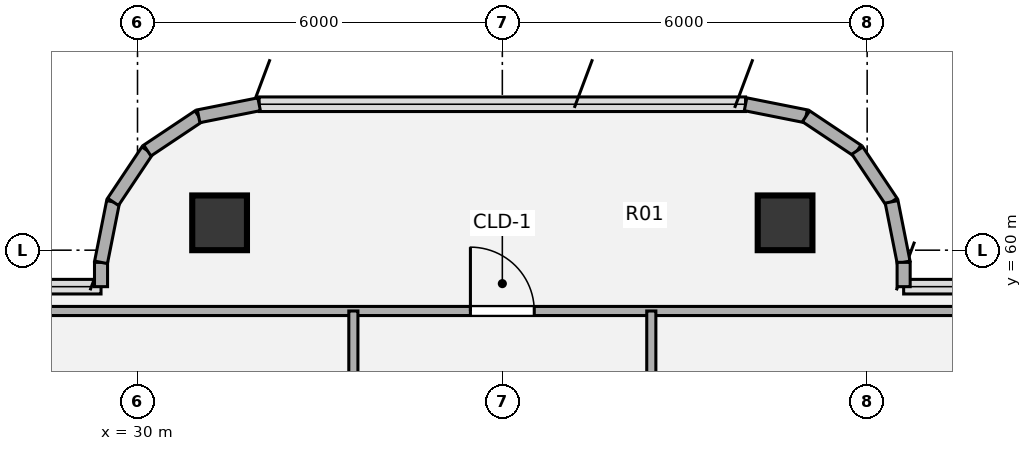
"""IFC4 building model, lengths in metres.
Left out: names, types, materials, properties, quantities, classifications, styles, units other than length and angle.
Written with IfcOpenShell. Run it as: python <this file> out.ifc"""

import sys

from ifc_helpers import new_model, si_unit, direction, frame, frame_2d, origin, origin_2d, place, context, subcontext, project, spatial, rectangle, hollow_circle, extrude, source, transform, mapped, element, fill, save


model = new_model("IFC4")
c1 = context("Model", 3, precision=1e-05, world=origin(), true_north=direction((0.0, 1.0)))
c2 = subcontext(c1, "Body", "Model", "MODEL_VIEW")
j1 = project(units=[si_unit("LENGTHUNIT", "METRE"), si_unit("PLANEANGLEUNIT", "RADIAN")], contexts=[c1])
p1 = place(None, origin())
s1 = spatial("IfcSite", under=j1, at=p1, CompositionType="ELEMENT")
p2 = place(p1, origin())
s2 = spatial("IfcBuilding", under=s1, at=p2, CompositionType="ELEMENT")
p3 = place(p2, frame((0.0, 0.0, 241.92)))
s3 = spatial("IfcBuildingStorey", under=s2, at=p3, CompositionType="ELEMENT", Elevation=241.92)
m1 = source(origin(), c2, "Body", "SweptSolid", [
    extrude(hollow_circle(Radius=0.45, WallThickness=0.032, at=origin_2d()), origin(), (0.0, 0.0, 1.0), 3.78),
])
for number, where, z_axis, x_axis in (
    (1, (31.35, 60.45, 0.0), (0.0, 0.0, 1.0), (1.0, 0.0, 0.0)),
    (2, (40.65, 60.45, 0.0), (0.0, 0.0, 1.0), (1.0, 0.0, 0.0)),
):
    element("IfcColumn", number, at=place(p3, frame(where, z_axis=z_axis, x_axis=x_axis)), inside=s3, PredefinedType="COLUMN", context=c2, shape_type="MappedRepresentation", body=[
        mapped(m1, transform((0.0, 0.0, 0.0), x_axis=(1.0, 0.0, 0.0), y_axis=(0.0, 1.0, 0.0), z_axis=(0.0, 0.0, 1.0), scale=1.0)),
    ])
p4 = place(p3, frame((29.4, 59.4, 0.0), z_axis=(0.0, 0.0, 1.0), x_axis=(0.0, 1.0, 0.0)))
e3 = element("IfcWall", 3, at=p4, inside=s3, PredefinedType="SOLIDWALL", context=c2, shape_type="SweptSolid", body=[
    extrude(rectangle(XDim=0.4, YDim=0.215, at=frame_2d((0.2, 0.0))), origin(), (0.0, 0.0, 1.0), 3.53),
])
p5 = place(p3, frame((29.4, 59.8, 0.0), z_axis=(0.0, 0.0, 1.0), x_axis=(0.195190360752, 0.980765376158, 0.0)))
e4 = element("IfcWall", 4, at=p5, inside=s3, PredefinedType="SOLIDWALL", context=c2, shape_type="SweptSolid", body=[
    extrude(rectangle(XDim=1.014, YDim=0.215, at=frame_2d((0.507, 0.0))), origin(), (0.0, 0.0, 1.0), 3.53),
])
p6 = place(p3, frame((29.598, 60.795, 0.0), z_axis=(0.0, 0.0, 1.0), x_axis=(0.555643898837, 0.831420385657, 0.0)))
e5 = element("IfcWall", 5, at=p6, inside=s3, PredefinedType="SOLIDWALL", context=c2, shape_type="SweptSolid", body=[
    extrude(rectangle(XDim=1.015, YDim=0.215, at=frame_2d((0.507, 0.0))), origin(), (0.0, 0.0, 1.0), 3.53),
])
p7 = place(p3, frame((30.162, 61.638, 0.0), z_axis=(0.0, 0.0, 1.0), x_axis=(0.831346067305, 0.555755086685, 0.0)))
e6 = element("IfcWall", 6, at=p7, inside=s3, PredefinedType="SOLIDWALL", context=c2, shape_type="SweptSolid", body=[
    extrude(rectangle(XDim=1.014, YDim=0.215, at=frame_2d((0.507, 0.0))), origin(), (0.0, 0.0, 1.0), 3.53),
])
for number, where, z_axis, x_axis in (
    (7, (31.005, 62.202, 0.0), (0.0, 0.0, 1.0), (0.981, 0.195, 0.0)),
    (8, (40.0, 62.4, 0.0), (0.0, 0.0, 1.0), (0.981, -0.195, 0.0)),
):
    element("IfcWall", number, at=place(p3, frame(where, z_axis=z_axis, x_axis=x_axis)), inside=s3, PredefinedType="SOLIDWALL", context=c2, shape_type="SweptSolid", body=[
        extrude(rectangle(XDim=1.015, YDim=0.215, at=frame_2d((0.507, 0.0))), origin(), (0.0, 0.0, 1.0), 3.53),
    ])
p8 = place(p3, frame((40.995, 62.202, 0.0), z_axis=(0.0, 0.0, 1.0), x_axis=(0.831346067305, -0.555755086685, 0.0)))
e9 = element("IfcWall", 9, at=p8, inside=s3, PredefinedType="SOLIDWALL", context=c2, shape_type="SweptSolid", body=[
    extrude(rectangle(XDim=1.014, YDim=0.215, at=frame_2d((0.507, 0.0))), origin(), (0.0, 0.0, 1.0), 3.53),
])
p9 = place(p3, frame((41.838, 61.638, 0.0), z_axis=(0.0, 0.0, 1.0), x_axis=(0.555643898837, -0.831420385657, 0.0)))
e10 = element("IfcWall", 10, at=p9, inside=s3, PredefinedType="SOLIDWALL", context=c2, shape_type="SweptSolid", body=[
    extrude(rectangle(XDim=1.015, YDim=0.215, at=frame_2d((0.507, 0.0))), origin(), (0.0, 0.0, 1.0), 3.53),
])
p10 = place(p3, frame((42.402, 60.795, 0.0), z_axis=(0.0, 0.0, 1.0), x_axis=(0.195190360752, -0.980765376158, 0.0)))
e11 = element("IfcWall", 11, at=p10, inside=s3, PredefinedType="SOLIDWALL", context=c2, shape_type="SweptSolid", body=[
    extrude(rectangle(XDim=1.014, YDim=0.215, at=frame_2d((0.507, 0.0))), origin(), (0.0, 0.0, 1.0), 3.53),
])
p11 = place(p3, frame((42.6, 59.8, 0.0), z_axis=(0.0, 0.0, 1.0), x_axis=(0.0, -1.0, 0.0)))
e12 = element("IfcWall", 12, at=p11, inside=s3, PredefinedType="SOLIDWALL", context=c2, shape_type="SweptSolid", body=[
    extrude(rectangle(XDim=0.4, YDim=0.215, at=frame_2d((0.2, 0.0))), origin(), (0.0, 0.0, 1.0), 3.53),
])
p12 = place(p3, frame((27.1, 59.0, 0.0), z_axis=(0.0, 0.0, 1.0), x_axis=(1.0, 0.0, 0.0)))
e13 = element("IfcWall", 13, at=p12, inside=s3, PredefinedType="PARTITIONING", context=c2, shape_type="SweptSolid", body=[
    extrude(rectangle(XDim=17.8, YDim=0.15, at=frame_2d((8.9, 0.0))), origin(), (0.0, 0.0, 1.0), 3.308),
])
p13 = place(p12, frame((8.375, 0.0, 0.0)))
e14 = element("IfcOpeningElement", 14, at=p13, cuts=e13, PredefinedType="OPENING", context=c2, shape_type="SweptSolid", body=[
    extrude(rectangle(XDim=1.05, YDim=2.1, at=origin_2d()), frame((0.525, 0.085, 1.05), z_axis=(0.0, -1.0, 0.0), x_axis=(1.0, 0.0, 0.0)), (0.0, 0.0, 1.0), 0.17),
])
p14 = place(p3, frame((33.55, 48.908, 0.0), z_axis=(0.0, 0.0, 1.0), x_axis=(0.0, 1.0, 0.0)))
e15 = element("IfcWall", 15, at=p14, inside=s3, PredefinedType="PARTITIONING", context=c2, shape_type="SweptSolid", body=[
    extrude(rectangle(XDim=10.092, YDim=0.15, at=frame_2d((5.046, 0.0))), origin(), (0.0, 0.0, 1.0), 3.5),
])
p15 = place(p14, frame((4.521, 0.0, 0.0)))
e16 = element("IfcOpeningElement", 16, at=p15, cuts=e15, PredefinedType="OPENING", context=c2, shape_type="SweptSolid", body=[
    extrude(rectangle(XDim=1.05, YDim=2.1, at=origin_2d()), frame((0.525, 0.085, 1.05), z_axis=(0.0, -1.0, 0.0), x_axis=(1.0, 0.0, 0.0)), (0.0, 0.0, 1.0), 0.17),
])
p16 = place(p3, frame((38.45, 48.908, 0.0), z_axis=(0.0, 0.0, 1.0), x_axis=(0.0, 1.0, 0.0)))
e17 = element("IfcWall", 17, at=p16, inside=s3, PredefinedType="PARTITIONING", context=c2, shape_type="SweptSolid", body=[
    extrude(rectangle(XDim=10.092, YDim=0.15, at=frame_2d((5.046, 0.0))), origin(), (0.0, 0.0, 1.0), 3.5),
])
p17 = place(p16, frame((4.521, 0.0, 0.0)))
e18 = element("IfcOpeningElement", 18, at=p17, cuts=e17, PredefinedType="OPENING", context=c2, shape_type="SweptSolid", body=[
    extrude(rectangle(XDim=1.05, YDim=2.1, at=origin_2d()), frame((0.525, 0.085, 1.05), z_axis=(0.0, -1.0, 0.0), x_axis=(1.0, 0.0, 0.0)), (0.0, 0.0, 1.0), 0.17),
])
m2 = source(origin(), c2, "Body", "SweptSolid", [
    extrude(rectangle(XDim=1.05, YDim=2.1, at=origin_2d()), frame((0.525, 0.025, 1.05), z_axis=(0.0, -1.0, 0.0), x_axis=(1.0, 0.0, 0.0)), (0.0, 0.0, 1.0), 0.05),
])
p18 = place(p13, origin())
e19 = element("IfcDoor", 19, at=p18, inside=s3, OperationType="SINGLE_SWING_LEFT", PredefinedType="DOOR", context=c2, shape_type="MappedRepresentation", body=[
    mapped(m2, transform((0.0, 0.0, 0.0), x_axis=(1.0, 0.0, 0.0), y_axis=(0.0, 1.0, 0.0), z_axis=(0.0, 0.0, 1.0), scale=1.0)),
])
fill(e14, e19)
save(model, sys.argv[1])
